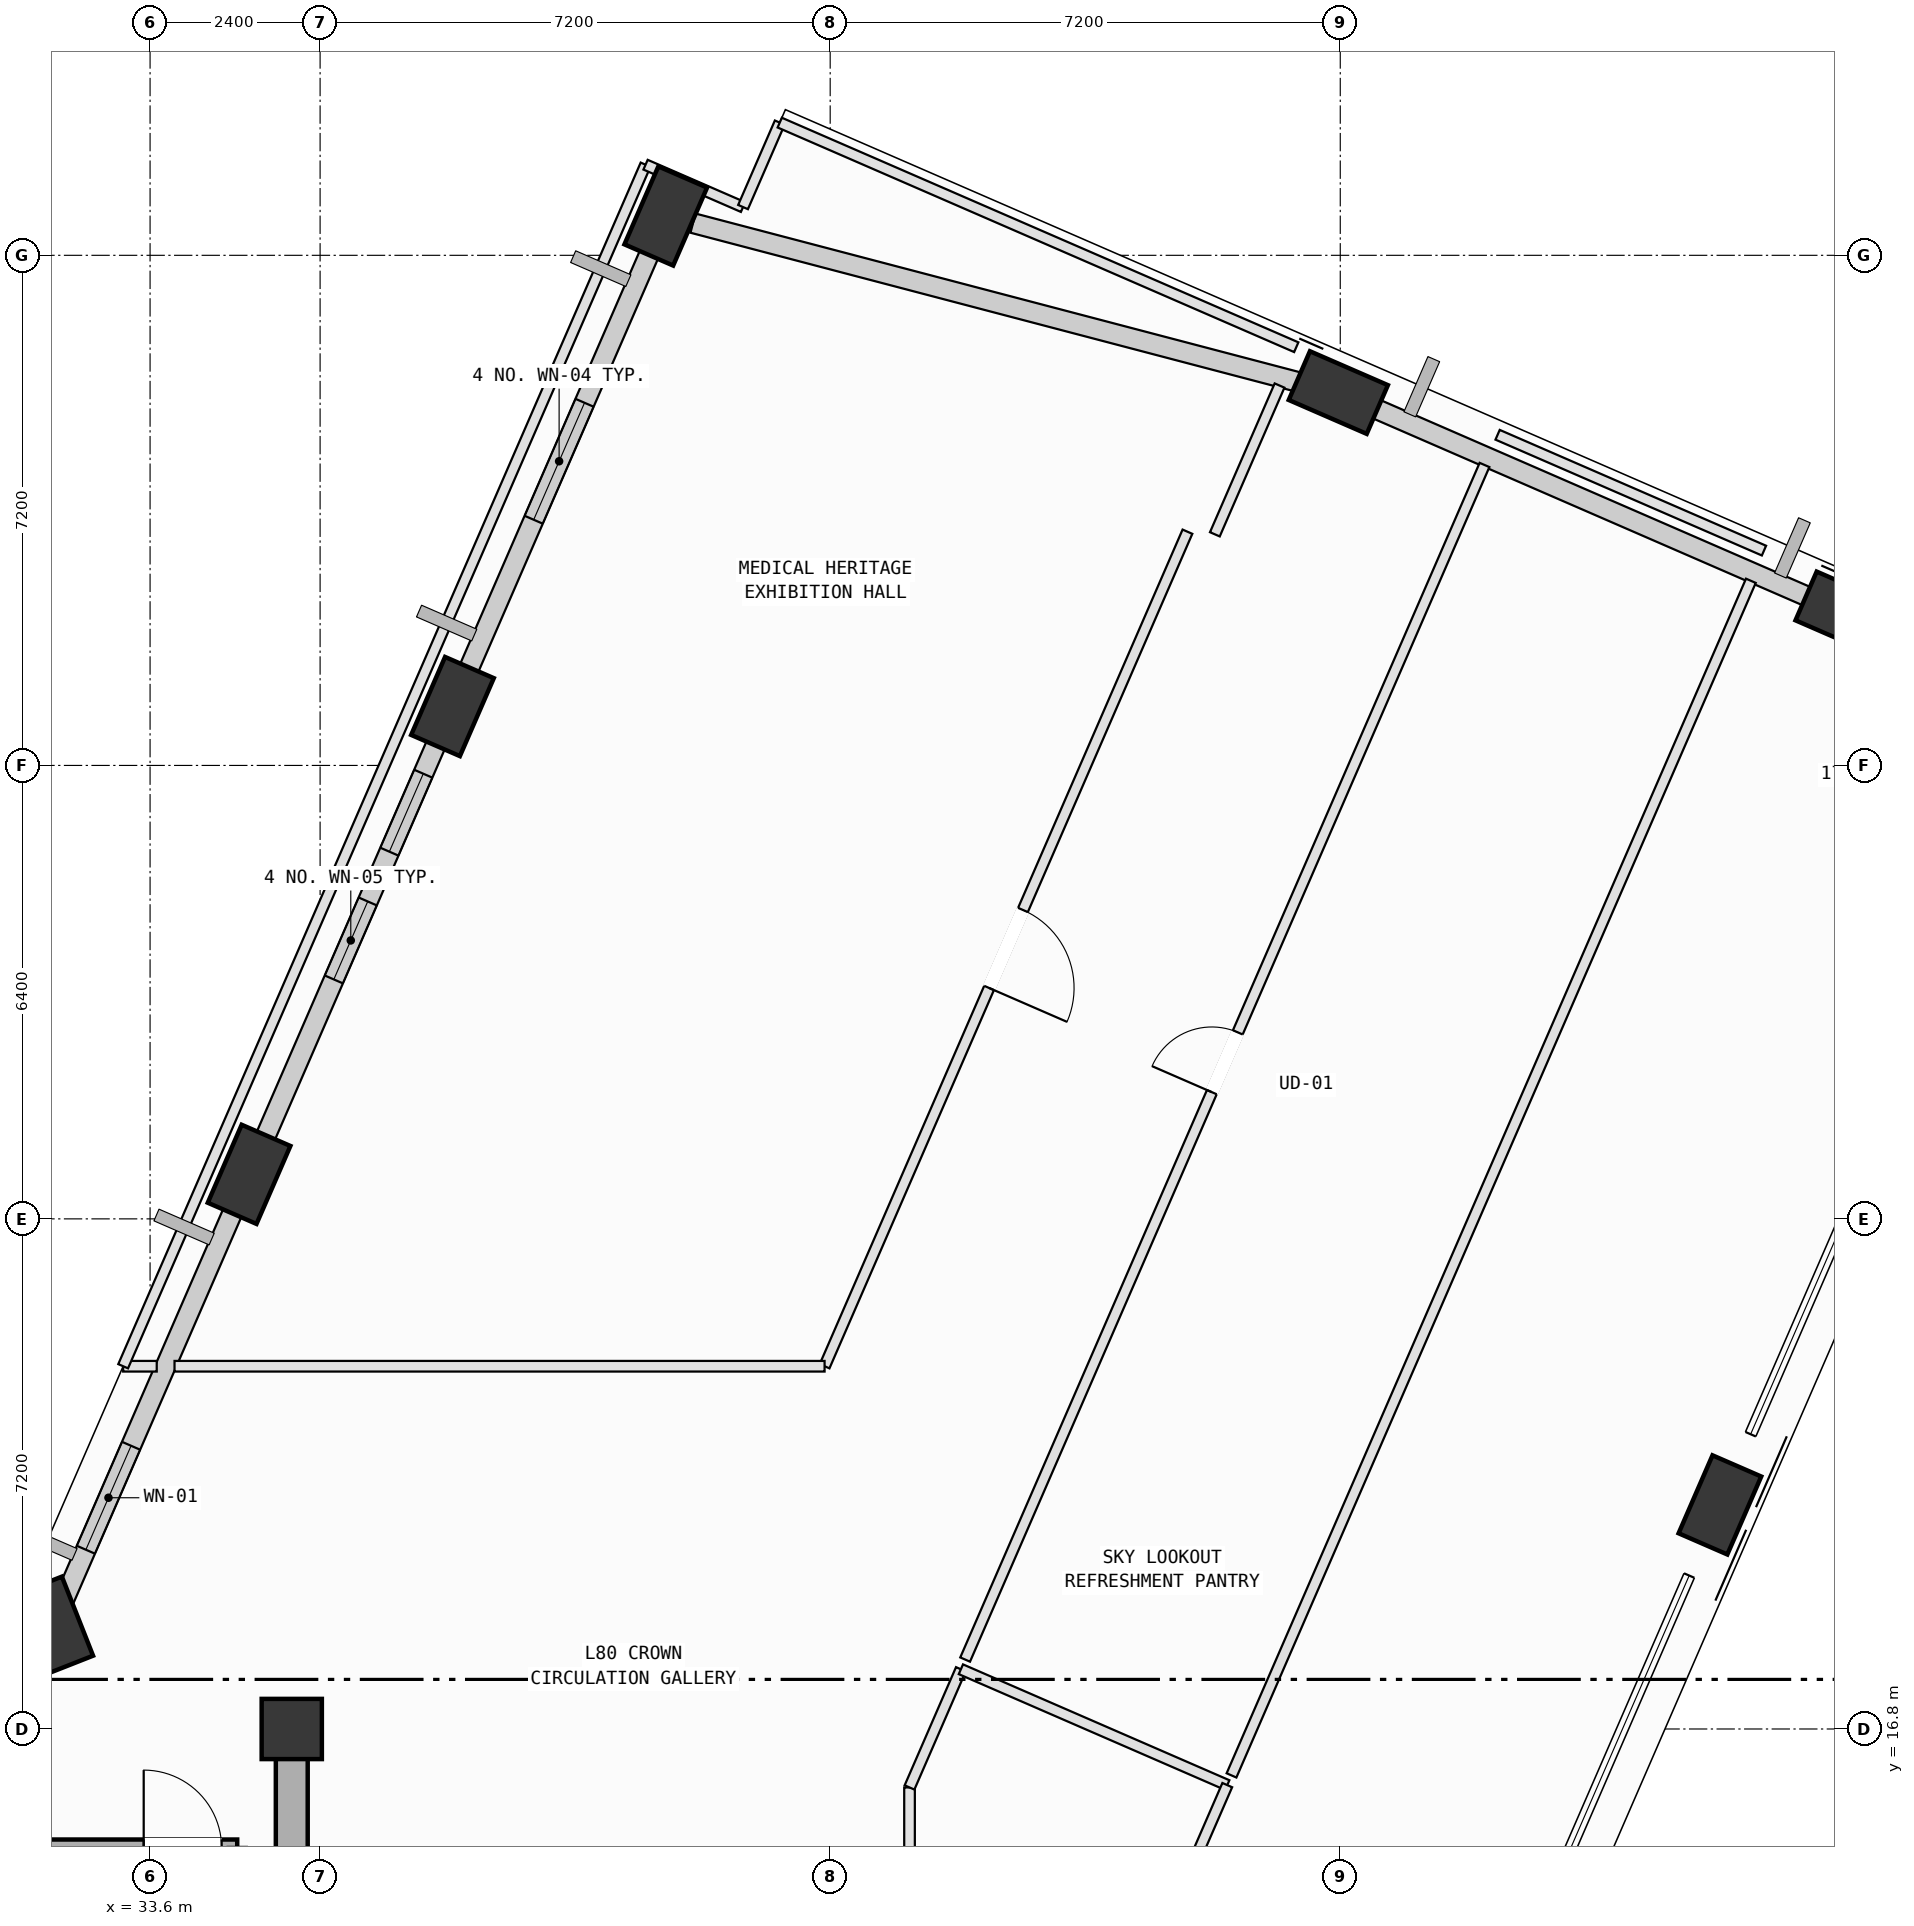
"""IFC4 building model, lengths in metres.
Left out: names, types, materials, properties, quantities, classifications, styles, units other than length and angle.
Written with IfcOpenShell. Run it as: python <this file> out.ifc"""

import sys

from ifc_helpers import new_model, si_unit, direction, frame, frame_2d, origin, origin_2d, place, context, subcontext, project, spatial, rectangle, extrude, element, fill, save


model = new_model("IFC4")
c1 = context("Model", 3, precision=1e-05, world=origin(), true_north=direction((0.0, 1.0)))
c2 = subcontext(c1, "Body", "Model", "MODEL_VIEW")
j1 = project(units=[si_unit("LENGTHUNIT", "METRE"), si_unit("PLANEANGLEUNIT", "RADIAN")], contexts=[c1])
p1 = place(None, origin())
s1 = spatial("IfcSite", under=j1, at=p1, CompositionType="ELEMENT")
p2 = place(p1, origin())
s2 = spatial("IfcBuilding", under=s1, at=p2, CompositionType="ELEMENT")
p3 = place(p2, frame((0.0, 0.0, 333.4)))
s3 = spatial("IfcBuildingStorey", under=s2, at=p3, CompositionType="ELEMENT", Elevation=333.4)
p4 = place(p3, frame((35.6, 16.8, 0.0), z_axis=(0.0, 0.0, 1.0), x_axis=(1.0, 0.0, 0.0)))
e1 = element("IfcColumn", 1, at=p4, inside=s3, PredefinedType="COLUMN", context=c2, shape_type="SweptSolid", body=[
    extrude(rectangle(XDim=0.85, YDim=0.85, at=origin_2d()), origin(), (0.0, 0.0, 1.0), 4.8),
])
for number, where, z_axis, x_axis in (
    (2, (55.759, 19.963, 0.002), (0.0, 0.0, 1.0), (0.399, 0.917, 0.0)),
    (3, (57.526, 32.553, 0.002), (0.0, 0.0, 1.0), (-0.917, 0.399, 0.0)),
    (4, (50.373, 35.663, 0.002), (0.0, 0.0, 1.0), (-0.917, 0.399, 0.0)),
    (5, (40.879, 38.155, 0.002), (0.0, 0.0, 1.0), (0.399, 0.917, 0.0)),
    (6, (37.868, 31.231, 0.002), (0.0, 0.0, 1.0), (0.399, 0.917, 0.0)),
    (7, (34.998, 24.628, 0.002), (0.0, 0.0, 1.0), (0.399, 0.917, 0.0)),
    (8, (32.226, 18.255, 0.002), (0.0, 0.0, 1.0), (-0.367, 0.93, 0.0)),
):
    element("IfcColumn", number, at=place(p3, frame(where, z_axis=z_axis, x_axis=x_axis)), inside=s3, PredefinedType="COLUMN", context=c2, shape_type="SweptSolid", body=[
        extrude(rectangle(XDim=1.2, YDim=0.75, at=origin_2d()), origin(), (0.0, 0.0, 1.0), 4.796),
    ])
p5 = place(p3, frame((50.737, 35.504, 0.0), z_axis=(0.0, 0.0, 1.0), x_axis=(0.917057311373, -0.398755423359, 0.0)))
e9 = element("IfcWall", 9, at=p5, inside=s3, PredefinedType="SOLIDWALL", context=c2, shape_type="SweptSolid", body=[
    extrude(rectangle(XDim=7.005, YDim=0.28, at=frame_2d((3.502, 0.0))), origin(), (0.0, 0.0, 1.0), 3.985),
])
p6 = place(p3, frame((41.264, 38.054, 0.0), z_axis=(0.0, 0.0, 1.0), x_axis=(0.967228971308, -0.253905724755, 0.0)))
e10 = element("IfcWall", 10, at=p6, inside=s3, PredefinedType="SOLIDWALL", context=c2, shape_type="SweptSolid", body=[
    extrude(rectangle(XDim=9.02, YDim=0.28, at=frame_2d((4.51, 0.0))), origin(), (0.0, 0.0, 1.0), 3.985),
])
p7 = place(p3, frame((38.027, 31.596, 0.0), z_axis=(0.0, 0.0, 1.0), x_axis=(0.398764437463, 0.917053391802, 0.0)))
e11 = element("IfcWall", 11, at=p7, inside=s3, PredefinedType="SOLIDWALL", context=c2, shape_type="SweptSolid", body=[
    extrude(rectangle(XDim=6.755, YDim=0.28, at=frame_2d((3.377, 0.0))), origin(), (0.0, 0.0, 1.0), 3.985),
])
p8 = place(p7, frame((2.478, 0.0, 0.75)))
e12 = element("IfcOpeningElement", 12, at=p8, cuts=e11, PredefinedType="OPENING", context=c2, shape_type="SweptSolid", body=[
    extrude(rectangle(XDim=1.8, YDim=2.05, at=frame_2d((0.9, 1.025))), frame((0.0, 0.15, 0.0), z_axis=(0.0, -1.0, 0.0), x_axis=(1.0, 0.0, 0.0)), (0.0, 0.0, 1.0), 0.3),
])
p9 = place(p3, frame((35.156, 24.993, 0.0), z_axis=(0.0, 0.0, 1.0), x_axis=(0.398758169539, 0.917056117272, 0.0)))
e13 = element("IfcWall", 13, at=p9, inside=s3, PredefinedType="SOLIDWALL", context=c2, shape_type="SweptSolid", body=[
    extrude(rectangle(XDim=6.405, YDim=0.28, at=frame_2d((3.202, 0.0))), origin(), (0.0, 0.0, 1.0), 3.985),
])
p10 = place(p9, frame((2.602, 0.0, 0.75)))
e14 = element("IfcOpeningElement", 14, at=p10, cuts=e13, PredefinedType="OPENING", context=c2, shape_type="SweptSolid", body=[
    extrude(rectangle(XDim=1.2, YDim=1.75, at=frame_2d((0.6, 0.875))), frame((0.0, 0.15, 0.0), z_axis=(0.0, -1.0, 0.0), x_axis=(1.0, 0.0, 0.0)), (0.0, 0.0, 1.0), 0.3),
])
p11 = place(p9, frame((4.569, 0.0, 0.75)))
e15 = element("IfcOpeningElement", 15, at=p11, cuts=e13, PredefinedType="OPENING", context=c2, shape_type="SweptSolid", body=[
    extrude(rectangle(XDim=1.2, YDim=1.75, at=frame_2d((0.6, 0.875))), frame((0.0, 0.15, 0.0), z_axis=(0.0, -1.0, 0.0), x_axis=(1.0, 0.0, 0.0)), (0.0, 0.0, 1.0), 0.3),
])
p12 = place(p3, frame((32.385, 18.619, 0.0), z_axis=(0.0, 0.0, 1.0), x_axis=(0.398753668733, 0.917058074318, 0.0)))
e16 = element("IfcWall", 16, at=p12, inside=s3, PredefinedType="SOLIDWALL", context=c2, shape_type="SweptSolid", body=[
    extrude(rectangle(XDim=6.155, YDim=0.28, at=frame_2d((3.078, 0.0))), origin(), (0.0, 0.0, 1.0), 3.985),
])
p13 = place(p12, frame((0.775, 0.0, 0.75)))
e17 = element("IfcOpeningElement", 17, at=p13, cuts=e16, PredefinedType="OPENING", context=c2, shape_type="SweptSolid", body=[
    extrude(rectangle(XDim=1.6, YDim=1.95, at=frame_2d((0.8, 0.975))), frame((0.0, 0.15, 0.0), z_axis=(0.0, -1.0, 0.0), x_axis=(1.0, 0.0, 0.0)), (0.0, 0.0, 1.0), 0.3),
])
p14 = place(p3, frame((31.37, 15.12, 0.0), z_axis=(0.0, 0.0, 1.0), x_axis=(1.0, 0.0, 0.0)))
e18 = element("IfcWall", 18, at=p14, inside=s3, PredefinedType="SOLIDWALL", context=c2, shape_type="SweptSolid", body=[
    extrude(rectangle(XDim=3.46, YDim=0.24, at=frame_2d((1.73, 0.0))), origin(), (0.0, 0.0, 1.0), 4.5),
])
p15 = place(p14, frame((2.14, 0.0, 0.0)))
e19 = element("IfcOpeningElement", 19, at=p15, cuts=e18, PredefinedType="OPENING", context=c2, shape_type="SweptSolid", body=[
    extrude(rectangle(XDim=1.1, YDim=2.15, at=frame_2d((0.55, 1.075))), frame((0.0, 0.13, 0.0), z_axis=(0.0, -1.0, 0.0), x_axis=(1.0, 0.0, 0.0)), (0.0, 0.0, 1.0), 0.26),
])
p16 = place(p3, frame((35.6, 7.8, 0.0), z_axis=(0.0, 0.0, 1.0), x_axis=(0.0, 1.0, 0.0)))
e20 = element("IfcWall", 20, at=p16, inside=s3, PredefinedType="SHEAR", context=c2, shape_type="SweptSolid", body=[
    extrude(rectangle(XDim=9.0, YDim=0.45, at=frame_2d((4.5, 0.0))), origin(), (0.0, 0.0, 1.0), 4.5),
])
p17 = place(p3, frame((44.32, 7.8, 0.0), z_axis=(0.0, 0.0, 1.0), x_axis=(0.0, 1.0, 0.0)))
e21 = element("IfcWall", 21, at=p17, inside=s3, PredefinedType="PARTITIONING", context=c2, shape_type="SweptSolid", body=[
    extrude(rectangle(XDim=8.175, YDim=0.15, at=frame_2d((4.087, 0.0))), origin(), (0.0, 0.0, 1.0), 4.135),
])
p18 = place(p3, frame((44.32, 15.975, 0.0), z_axis=(0.0, 0.0, 1.0), x_axis=(0.398564118579, 0.91714047091, 0.0)))
e22 = element("IfcWall", 22, at=p18, inside=s3, PredefinedType="PARTITIONING", context=c2, shape_type="SweptSolid", body=[
    extrude(rectangle(XDim=1.819, YDim=0.15, at=frame_2d((0.909, 0.0))), origin(), (0.0, 0.0, 1.0), 4.5),
])
p19 = place(p3, frame((45.045, 17.643, 0.0), z_axis=(0.0, 0.0, 1.0), x_axis=(0.917050175276, -0.398771834545, 0.0)))
e23 = element("IfcWall", 23, at=p19, inside=s3, PredefinedType="PARTITIONING", context=c2, shape_type="SweptSolid", body=[
    extrude(rectangle(XDim=4.1, YDim=0.15, at=frame_2d((2.05, 0.0))), origin(), (0.0, 0.0, 1.0), 4.5),
])
p20 = place(p3, frame((48.805, 16.008, 0.0), z_axis=(0.0, 0.0, 1.0), x_axis=(-0.398735038465, -0.917066174875, 0.0)))
e24 = element("IfcWall", 24, at=p20, inside=s3, PredefinedType="PARTITIONING", context=c2, shape_type="SweptSolid", body=[
    extrude(rectangle(XDim=24.0, YDim=0.15, at=frame_2d((12.0, 0.0))), origin(), (0.0, 0.0, 1.0), 4.5),
])
p21 = place(p20, frame((11.2, 0.0, 0.0)))
e25 = element("IfcOpeningElement", 25, at=p21, cuts=e24, PredefinedType="OPENING", context=c2, shape_type="SweptSolid", body=[
    extrude(rectangle(XDim=1.6, YDim=2.2, at=frame_2d((0.8, 1.1))), frame((0.0, 0.085, 0.0), z_axis=(0.0, -1.0, 0.0), x_axis=(1.0, 0.0, 0.0)), (0.0, 0.0, 1.0), 0.17),
])
p22 = place(p3, frame((45.105, 17.78, 0.0), z_axis=(0.0, 0.0, 1.0), x_axis=(0.398732909086, 0.917067100714, 0.0)))
e26 = element("IfcWall", 26, at=p22, inside=s3, PredefinedType="PARTITIONING", context=c2, shape_type="SweptSolid", body=[
    extrude(rectangle(XDim=18.386, YDim=0.15, at=frame_2d((9.193, 0.0))), origin(), (0.0, 0.0, 1.0), 4.135),
])
p23 = place(p22, frame((8.733, 0.0, 0.0)))
e27 = element("IfcOpeningElement", 27, at=p23, cuts=e26, PredefinedType="OPENING", context=c2, shape_type="SweptSolid", body=[
    extrude(rectangle(XDim=0.92, YDim=2.1, at=frame_2d((0.46, 1.05))), frame((0.0, 0.085, 0.0), z_axis=(0.0, -1.0, 0.0), x_axis=(1.0, 0.0, 0.0)), (0.0, 0.0, 1.0), 0.17),
])
p24 = place(p3, frame((52.621, 35.067, 0.0), z_axis=(0.0, 0.0, 1.0), x_axis=(0.917050175276, -0.398771834545, 0.0)))
e28 = element("IfcWall", 28, at=p24, inside=s3, PredefinedType="PARTITIONING", context=c2, shape_type="SweptSolid", body=[
    extrude(rectangle(XDim=4.1, YDim=0.15, at=frame_2d((2.05, 0.0))), origin(), (0.0, 0.0, 1.0), 3.985),
])
p25 = place(p3, frame((56.196, 33.006, 0.0), z_axis=(0.0, 0.0, 1.0), x_axis=(-0.398732909086, -0.917067100714, 0.0)))
e29 = element("IfcWall", 29, at=p25, inside=s3, PredefinedType="PARTITIONING", context=c2, shape_type="SweptSolid", body=[
    extrude(rectangle(XDim=18.386, YDim=0.15, at=frame_2d((9.193, 0.0))), origin(), (0.0, 0.0, 1.0), 4.5),
])
p26 = place(p3, frame((48.243, 33.699, 0.0), z_axis=(0.0, 0.0, 1.0), x_axis=(-0.398758777505, -0.917055852913, 0.0)))
e30 = element("IfcWall", 30, at=p26, inside=s3, PredefinedType="PARTITIONING", context=c2, shape_type="SweptSolid", body=[
    extrude(rectangle(XDim=12.844, YDim=0.15, at=frame_2d((6.422, 0.0))), origin(), (0.0, 0.0, 1.0), 3.485),
])
p27 = place(p26, frame((5.822, 0.0, 0.0)))
e31 = element("IfcOpeningElement", 31, at=p27, cuts=e30, PredefinedType="OPENING", context=c2, shape_type="SweptSolid", body=[
    extrude(rectangle(XDim=1.2, YDim=2.15, at=frame_2d((0.6, 1.075))), frame((0.0, 0.085, 0.0), z_axis=(0.0, -1.0, 0.0), x_axis=(1.0, 0.0, 0.0)), (0.0, 0.0, 1.0), 0.17),
])
p28 = place(p3, frame((43.121, 21.92, 0.0), z_axis=(0.0, 0.0, 1.0), x_axis=(-1.0, 0.0, 0.0)))
e32 = element("IfcWall", 32, at=p28, inside=s3, PredefinedType="PARTITIONING", context=c2, shape_type="SweptSolid", body=[
    extrude(rectangle(XDim=9.176, YDim=0.15, at=frame_2d((4.588, 0.0))), origin(), (0.0, 0.0, 1.0), 4.5),
])
p29 = place(p3, frame((33.694, 21.92, 0.0), z_axis=(0.0, 0.0, 1.0), x_axis=(-1.0, 0.0, 0.0)))
e33 = element("IfcWall", 33, at=p29, inside=s3, PredefinedType="PARTITIONING", context=c2, shape_type="SweptSolid", body=[
    extrude(rectangle(XDim=0.474, YDim=0.15, at=frame_2d((0.237, 0.0))), origin(), (0.0, 0.0, 1.0), 4.5),
])
p30 = place(p3, frame((33.22, 21.92, 0.0), z_axis=(0.0, 0.0, 1.0), x_axis=(0.39875121383, 0.917059141751, 0.0)))
e34 = element("IfcWall", 34, at=p30, inside=s3, PredefinedType="PARTITIONING", context=c2, shape_type="SweptSolid", body=[
    extrude(rectangle(XDim=18.493, YDim=0.15, at=frame_2d((9.246, 0.0))), origin(), (0.0, 0.0, 1.0), 4.5),
])
p31 = place(p3, frame((40.594, 38.879, 0.0), z_axis=(0.0, 0.0, 1.0), x_axis=(0.91715541112, -0.398529737728, 0.0)))
e35 = element("IfcWall", 35, at=p31, inside=s3, PredefinedType="PARTITIONING", context=c2, shape_type="SweptSolid", body=[
    extrude(rectangle(XDim=1.5, YDim=0.15, at=frame_2d((0.75, 0.0))), origin(), (0.0, 0.0, 1.0), 3.985),
])
p32 = place(p3, frame((41.97, 38.281, 0.0), z_axis=(0.0, 0.0, 1.0), x_axis=(0.398629941404, 0.917111863306, 0.0)))
e36 = element("IfcWall", 36, at=p32, inside=s3, PredefinedType="PARTITIONING", context=c2, shape_type="SweptSolid", body=[
    extrude(rectangle(XDim=1.3, YDim=0.15, at=frame_2d((0.65, 0.0))), origin(), (0.0, 0.0, 1.0), 4.5),
])
p33 = place(p3, frame((42.488, 39.473, 0.0), z_axis=(0.0, 0.0, 1.0), x_axis=(0.917073961881, -0.398717128351, 0.0)))
e37 = element("IfcWall", 37, at=p33, inside=s3, PredefinedType="PARTITIONING", context=c2, shape_type="SweptSolid", body=[
    extrude(rectangle(XDim=7.95, YDim=0.15, at=frame_2d((3.975, 0.0))), origin(), (0.0, 0.0, 1.0), 4.5),
])
p34 = place(p3, frame((49.543, 35.762, 0.0), z_axis=(0.0, 0.0, 1.0), x_axis=(-0.398765098315, -0.917053104441, 0.0)))
e38 = element("IfcWall", 38, at=p34, inside=s3, PredefinedType="PARTITIONING", context=c2, shape_type="SweptSolid", body=[
    extrude(rectangle(XDim=2.29, YDim=0.15, at=frame_2d((1.145, 0.0))), origin(), (0.0, 0.0, 1.0), 3.485),
])
p35 = place(p8, origin())
e39 = element("IfcWindow", 39, at=p35, inside=s3, PartitioningType="SINGLE_PANEL", PredefinedType="WINDOW", context=c2, shape_type="SweptSolid", body=[
    extrude(rectangle(XDim=1.8, YDim=2.05, at=frame_2d((0.9, 1.025))), frame((0.0, 0.03, 0.0), z_axis=(0.0, -1.0, 0.0), x_axis=(1.0, 0.0, 0.0)), (0.0, 0.0, 1.0), 0.06),
])
fill(e12, e39)
p36 = place(p10, origin())
e40 = element("IfcWindow", 40, at=p36, inside=s3, PartitioningType="SINGLE_PANEL", PredefinedType="WINDOW", context=c2, shape_type="SweptSolid", body=[
    extrude(rectangle(XDim=1.2, YDim=1.75, at=frame_2d((0.6, 0.875))), frame((0.0, 0.03, 0.0), z_axis=(0.0, -1.0, 0.0), x_axis=(1.0, 0.0, 0.0)), (0.0, 0.0, 1.0), 0.06),
])
fill(e14, e40)
p37 = place(p11, origin())
e41 = element("IfcWindow", 41, at=p37, inside=s3, PartitioningType="SINGLE_PANEL", PredefinedType="WINDOW", context=c2, shape_type="SweptSolid", body=[
    extrude(rectangle(XDim=1.2, YDim=1.75, at=frame_2d((0.6, 0.875))), frame((0.0, 0.03, 0.0), z_axis=(0.0, -1.0, 0.0), x_axis=(1.0, 0.0, 0.0)), (0.0, 0.0, 1.0), 0.06),
])
fill(e15, e41)
p38 = place(p13, origin())
e42 = element("IfcWindow", 42, at=p38, inside=s3, PartitioningType="SINGLE_PANEL", PredefinedType="WINDOW", context=c2, shape_type="SweptSolid", body=[
    extrude(rectangle(XDim=1.6, YDim=1.95, at=frame_2d((0.8, 0.975))), frame((0.0, 0.03, 0.0), z_axis=(0.0, -1.0, 0.0), x_axis=(1.0, 0.0, 0.0)), (0.0, 0.0, 1.0), 0.06),
])
fill(e17, e42)
p39 = place(p23, origin())
e43 = element("IfcDoor", 43, at=p39, inside=s3, OperationType="SINGLE_SWING_LEFT", PredefinedType="DOOR", context=c2, shape_type="SweptSolid", body=[
    extrude(rectangle(XDim=0.92, YDim=2.1, at=frame_2d((0.46, 1.05))), frame((0.0, 0.025, 0.0), z_axis=(0.0, -1.0, 0.0), x_axis=(1.0, 0.0, 0.0)), (0.0, 0.0, 1.0), 0.05),
])
fill(e27, e43)
p40 = place(p27, origin())
e44 = element("IfcDoor", 44, at=p40, inside=s3, OperationType="SINGLE_SWING_RIGHT", PredefinedType="DOOR", context=c2, shape_type="SweptSolid", body=[
    extrude(rectangle(XDim=1.2, YDim=2.15, at=frame_2d((0.6, 1.075))), frame((0.0, 0.025, 0.0), z_axis=(0.0, -1.0, 0.0), x_axis=(1.0, 0.0, 0.0)), (0.0, 0.0, 1.0), 0.05),
])
fill(e31, e44)
save(model, sys.argv[1])
